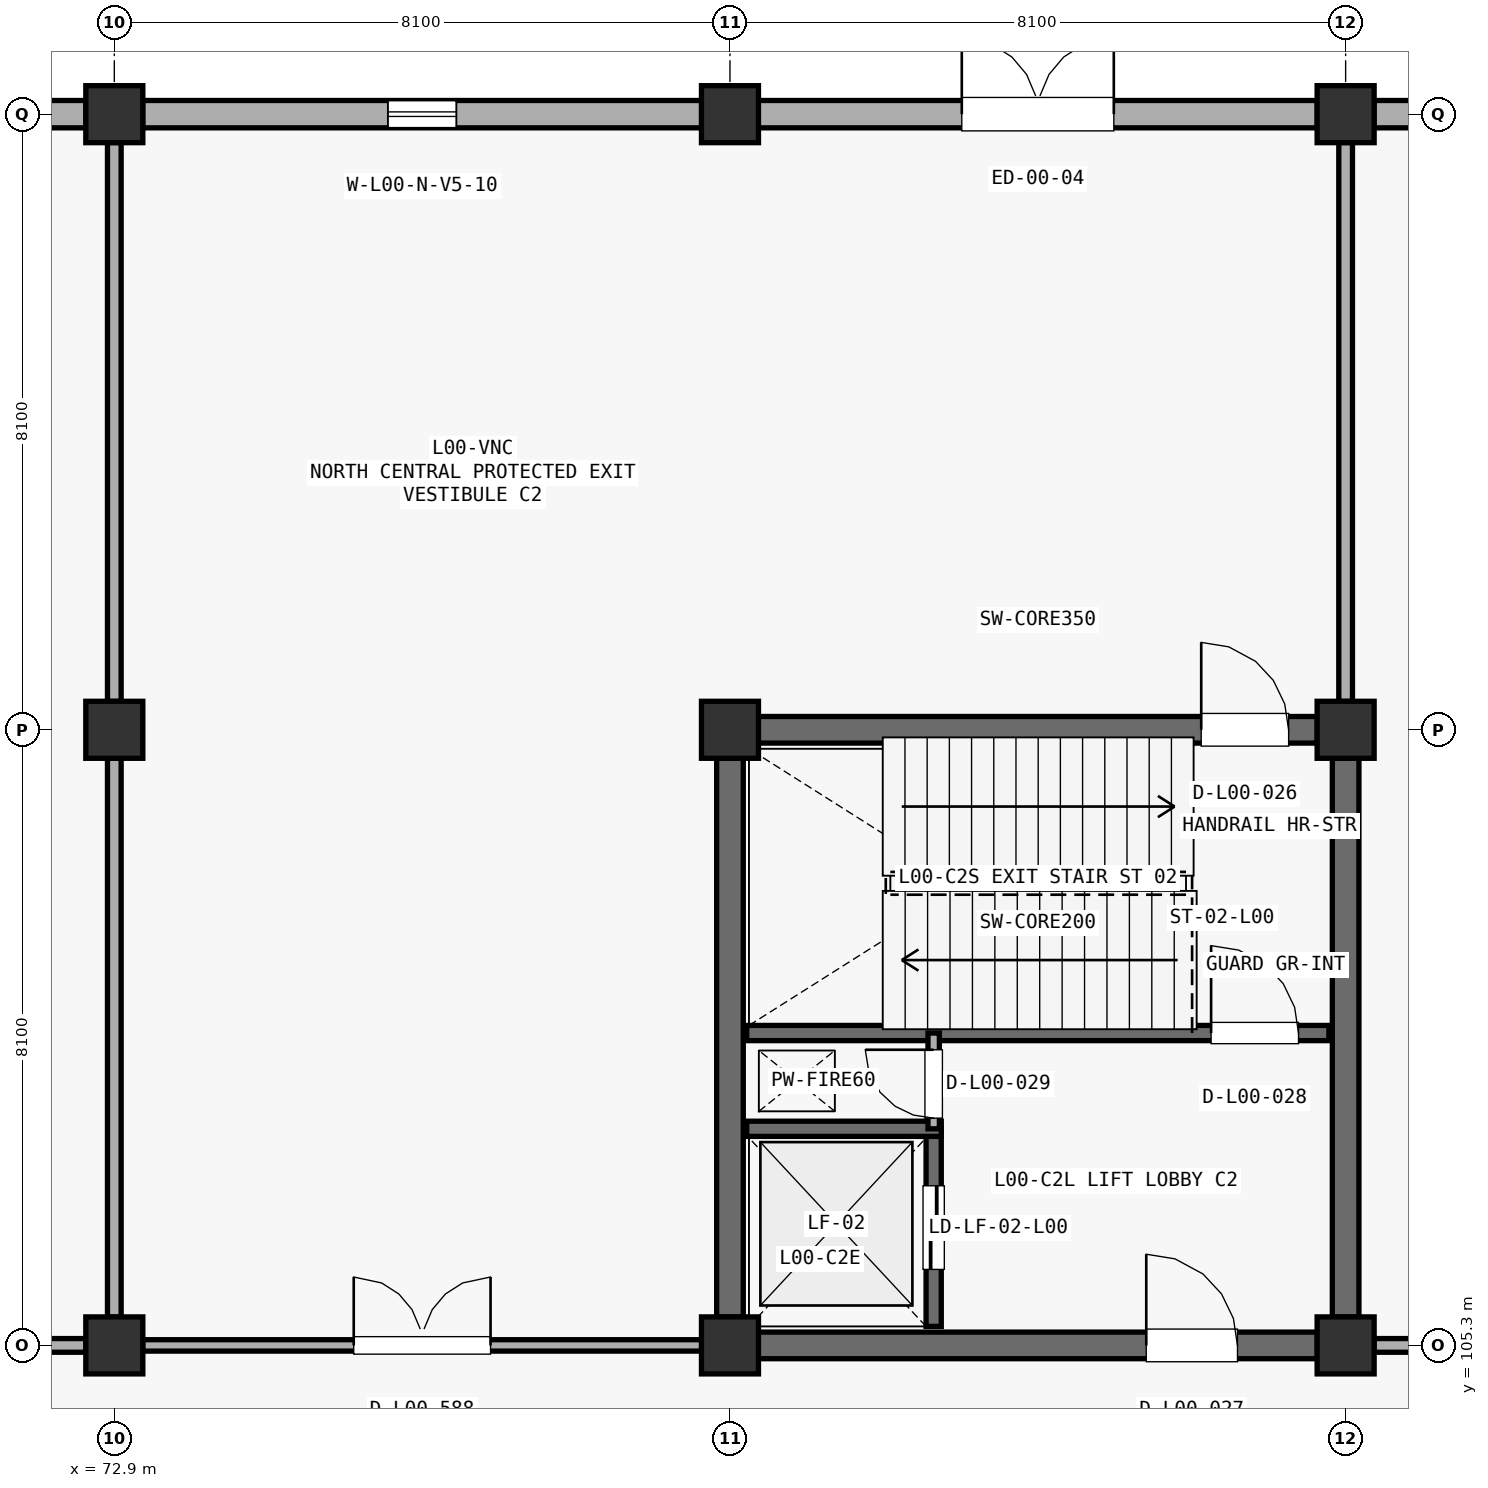
"""IFC4 building model, lengths in metres.
Left out: names, types, materials, properties, quantities, classifications, styles, units other than length and angle.
Written with IfcOpenShell. Run it as: python <this file> out.ifc"""

import sys

from ifc_helpers import new_model, si_unit, direction, frame, frame_2d, origin, origin_2d, place, context, subcontext, project, spatial, rectangle, extrude, element, fill, save


model = new_model("IFC4")
c1 = context("Model", 3, precision=1e-05, world=origin(), true_north=direction((0.0, 1.0)))
c2 = subcontext(c1, "Body", "Model", "MODEL_VIEW")
j1 = project(units=[si_unit("LENGTHUNIT", "METRE"), si_unit("PLANEANGLEUNIT", "RADIAN")], contexts=[c1])
p1 = place(None, origin())
s1 = spatial("IfcSite", under=j1, at=p1, CompositionType="ELEMENT")
p2 = place(p1, origin())
s2 = spatial("IfcBuilding", under=s1, at=p2, CompositionType="ELEMENT")
p3 = place(p2, origin())
s3 = spatial("IfcBuildingStorey", under=s2, at=p3, CompositionType="ELEMENT", Elevation=0.0)
for number, where, z_axis, x_axis in (
    (1, (72.9, 105.3, 0.0), (0.0, 0.0, 1.0), (1.0, 0.0, 0.0)),
    (2, (72.9, 113.4, 0.0), (0.0, 0.0, 1.0), (1.0, 0.0, 0.0)),
    (3, (72.9, 121.5, 0.0), (0.0, 0.0, 1.0), (1.0, 0.0, 0.0)),
    (4, (81.0, 105.3, 0.0), (0.0, 0.0, 1.0), (1.0, 0.0, 0.0)),
    (5, (81.0, 113.4, 0.0), (0.0, 0.0, 1.0), (1.0, 0.0, 0.0)),
    (6, (81.0, 121.5, 0.0), (0.0, 0.0, 1.0), (1.0, 0.0, 0.0)),
    (7, (89.1, 105.3, 0.0), (0.0, 0.0, 1.0), (1.0, 0.0, 0.0)),
    (8, (89.1, 113.4, 0.0), (0.0, 0.0, 1.0), (1.0, 0.0, 0.0)),
    (9, (89.1, 121.5, 0.0), (0.0, 0.0, 1.0), (1.0, 0.0, 0.0)),
):
    element("IfcColumn", number, at=place(p3, frame(where, z_axis=z_axis, x_axis=x_axis)), inside=s3, PredefinedType="COLUMN", context=c2, shape_type="SweptSolid", body=[
        extrude(rectangle(XDim=0.75, YDim=0.75, at=origin_2d()), origin(), (0.0, 0.0, 1.0), 5.1),
    ])
p4 = place(p3, frame((65.173, 121.5, 0.0), z_axis=(0.0, 0.0, 1.0), x_axis=(1.0, 0.0, 0.0)))
e10 = element("IfcWall", 10, at=p4, inside=s3, PredefinedType="STANDARD", context=c2, shape_type="SweptSolid", body=[
    extrude(rectangle(XDim=7.354, YDim=0.36, at=frame_2d((3.677, 0.0))), origin(), (0.0, 0.0, 1.0), 3.872),
])
p5 = place(p4, frame((2.477, 0.0, 0.0)))
e11 = element("IfcOpeningElement", 11, at=p5, cuts=e10, PredefinedType="OPENING", context=c2, shape_type="SweptSolid", body=[
    extrude(rectangle(XDim=2.4, YDim=2.4, at=frame_2d((1.2, 1.2))), frame((0.0, 0.19, 0.0), z_axis=(0.0, -1.0, 0.0), x_axis=(1.0, 0.0, 0.0)), (0.0, 0.0, 1.0), 0.38),
])
p6 = place(p3, frame((73.273, 121.5, 0.0), z_axis=(0.0, 0.0, 1.0), x_axis=(1.0, 0.0, 0.0)))
e12 = element("IfcWall", 12, at=p6, inside=s3, PredefinedType="STANDARD", context=c2, shape_type="SweptSolid", body=[
    extrude(rectangle(XDim=7.354, YDim=0.36, at=frame_2d((3.677, 0.0))), origin(), (0.0, 0.0, 1.0), 4.407),
])
p7 = place(p6, frame((3.227, 0.0, 0.85)))
e13 = element("IfcOpeningElement", 13, at=p7, cuts=e12, PredefinedType="OPENING", context=c2, shape_type="SweptSolid", body=[
    extrude(rectangle(XDim=0.9, YDim=1.9, at=frame_2d((0.45, 0.95))), frame((0.0, 0.19, 0.0), z_axis=(0.0, -1.0, 0.0), x_axis=(1.0, 0.0, 0.0)), (0.0, 0.0, 1.0), 0.38),
])
p8 = place(p3, frame((81.373, 121.5, 0.0), z_axis=(0.0, 0.0, 1.0), x_axis=(1.0, 0.0, 0.0)))
e14 = element("IfcWall", 14, at=p8, inside=s3, PredefinedType="STANDARD", context=c2, shape_type="SweptSolid", body=[
    extrude(rectangle(XDim=7.354, YDim=0.36, at=frame_2d((3.677, 0.0))), origin(), (0.0, 0.0, 1.0), 4.172),
])
p9 = place(p8, frame((2.677, 0.0, 0.0)))
e15 = element("IfcOpeningElement", 15, at=p9, cuts=e14, PredefinedType="OPENING", context=c2, shape_type="SweptSolid", body=[
    extrude(rectangle(XDim=2.0, YDim=2.2, at=frame_2d((1.0, 1.1))), frame((0.0, 0.19, 0.0), z_axis=(0.0, -1.0, 0.0), x_axis=(1.0, 0.0, 0.0)), (0.0, 0.0, 1.0), 0.38),
])
p10 = place(p3, frame((89.473, 121.5, 0.0), z_axis=(0.0, 0.0, 1.0), x_axis=(1.0, 0.0, 0.0)))
e16 = element("IfcWall", 16, at=p10, inside=s3, PredefinedType="STANDARD", context=c2, shape_type="SweptSolid", body=[
    extrude(rectangle(XDim=7.354, YDim=0.36, at=frame_2d((3.677, 0.0))), origin(), (0.0, 0.0, 1.0), 4.222),
])
p11 = place(p10, frame((2.677, 0.0, 0.85)))
e17 = element("IfcOpeningElement", 17, at=p11, cuts=e16, PredefinedType="OPENING", context=c2, shape_type="SweptSolid", body=[
    extrude(rectangle(XDim=2.0, YDim=1.4, at=frame_2d((1.0, 0.7))), frame((0.0, 0.19, 0.0), z_axis=(0.0, -1.0, 0.0), x_axis=(1.0, 0.0, 0.0)), (0.0, 0.0, 1.0), 0.38),
])
p12 = place(p3, frame((81.373, 113.4, 0.0), z_axis=(0.0, 0.0, 1.0), x_axis=(1.0, 0.0, 0.0)))
e18 = element("IfcWall", 18, at=p12, inside=s3, PredefinedType="SHEAR", context=c2, shape_type="SweptSolid", body=[
    extrude(rectangle(XDim=7.354, YDim=0.35, at=frame_2d((3.677, 0.0))), origin(), (0.0, 0.0, 1.0), 4.822),
])
p13 = place(p12, frame((5.827, 0.0, 0.0)))
e19 = element("IfcOpeningElement", 19, at=p13, cuts=e18, PredefinedType="OPENING", context=c2, shape_type="SweptSolid", body=[
    extrude(rectangle(XDim=1.15, YDim=2.2, at=frame_2d((0.575, 1.1))), frame((0.0, 0.185, 0.0), z_axis=(0.0, -1.0, 0.0), x_axis=(1.0, 0.0, 0.0)), (0.0, 0.0, 1.0), 0.37),
])
for number, where, z_axis, x_axis in (
    (20, (81.0, 105.673, 0.0), (0.0, 0.0, 1.0), (0.0, 1.0, 0.0)),
    (21, (89.1, 105.673, 0.0), (0.0, 0.0, 1.0), (0.0, 1.0, 0.0)),
):
    element("IfcWall", number, at=place(p3, frame(where, z_axis=z_axis, x_axis=x_axis)), inside=s3, PredefinedType="SHEAR", context=c2, shape_type="SweptSolid", body=[
        extrude(rectangle(XDim=7.354, YDim=0.35, at=frame_2d((3.677, 0.0))), origin(), (0.0, 0.0, 1.0), 4.822),
    ])
p14 = place(p3, frame((81.373, 105.3, 0.0), z_axis=(0.0, 0.0, 1.0), x_axis=(1.0, 0.0, 0.0)))
e22 = element("IfcWall", 22, at=p14, inside=s3, PredefinedType="SHEAR", context=c2, shape_type="SweptSolid", body=[
    extrude(rectangle(XDim=7.354, YDim=0.35, at=frame_2d((3.677, 0.0))), origin(), (0.0, 0.0, 1.0), 4.822),
])
p15 = place(p14, frame((5.104, 0.0, 0.0)))
e23 = element("IfcOpeningElement", 23, at=p15, cuts=e22, PredefinedType="OPENING", context=c2, shape_type="SweptSolid", body=[
    extrude(rectangle(XDim=1.2, YDim=2.2, at=frame_2d((0.6, 1.1))), frame((0.0, 0.185, 0.0), z_axis=(0.0, -1.0, 0.0), x_axis=(1.0, 0.0, 0.0)), (0.0, 0.0, 1.0), 0.37),
])
p16 = place(p3, frame((81.22, 109.41, 0.0), z_axis=(0.0, 0.0, 1.0), x_axis=(1.0, 0.0, 0.0)))
e24 = element("IfcWall", 24, at=p16, inside=s3, PredefinedType="SHEAR", context=c2, shape_type="SweptSolid", body=[
    extrude(rectangle(XDim=7.66, YDim=0.2, at=frame_2d((3.83, 0.0))), origin(), (0.0, 0.0, 1.0), 4.822),
])
p17 = place(p16, frame((6.11, 0.0, 0.0)))
e25 = element("IfcOpeningElement", 25, at=p17, cuts=e24, PredefinedType="OPENING", context=c2, shape_type="SweptSolid", body=[
    extrude(rectangle(XDim=1.15, YDim=2.2, at=frame_2d((0.575, 1.1))), frame((0.0, 0.11, 0.0), z_axis=(0.0, -1.0, 0.0), x_axis=(1.0, 0.0, 0.0)), (0.0, 0.0, 1.0), 0.22),
])
p18 = place(p3, frame((83.68, 105.55, 0.0), z_axis=(0.0, 0.0, 1.0), x_axis=(0.0, 1.0, 0.0)))
e26 = element("IfcWall", 26, at=p18, inside=s3, PredefinedType="SHEAR", context=c2, shape_type="SweptSolid", body=[
    extrude(rectangle(XDim=2.6, YDim=0.2, at=frame_2d((1.3, 0.0))), origin(), (0.0, 0.0, 1.0), 4.822),
])
p19 = place(p18, frame((0.75, 0.0, 0.0)))
e27 = element("IfcOpeningElement", 27, at=p19, cuts=e26, PredefinedType="OPENING", context=c2, shape_type="SweptSolid", body=[
    extrude(rectangle(XDim=1.1, YDim=2.2, at=frame_2d((0.55, 1.1))), frame((0.0, 0.11, 0.0), z_axis=(0.0, -1.0, 0.0), x_axis=(1.0, 0.0, 0.0)), (0.0, 0.0, 1.0), 0.22),
])
p20 = place(p3, frame((81.22, 108.15, 0.0), z_axis=(0.0, 0.0, 1.0), x_axis=(1.0, 0.0, 0.0)))
e28 = element("IfcWall", 28, at=p20, inside=s3, PredefinedType="SHEAR", context=c2, shape_type="SweptSolid", body=[
    extrude(rectangle(XDim=2.56, YDim=0.2, at=frame_2d((1.28, 0.0))), origin(), (0.0, 0.0, 1.0), 4.822),
])
p21 = place(p3, frame((83.68, 108.15, 0.0), z_axis=(0.0, 0.0, 1.0), x_axis=(0.0, 1.0, 0.0)))
e29 = element("IfcWall", 29, at=p21, inside=s3, PredefinedType="PARTITIONING", context=c2, shape_type="SweptSolid", body=[
    extrude(rectangle(XDim=1.26, YDim=0.15, at=frame_2d((0.63, 0.0))), origin(), (0.0, 0.0, 1.0), 4.822),
])
p22 = place(p21, frame((0.14, 0.0, 0.0)))
e30 = element("IfcOpeningElement", 30, at=p22, cuts=e29, PredefinedType="OPENING", context=c2, shape_type="SweptSolid", body=[
    extrude(rectangle(XDim=0.9, YDim=2.15, at=frame_2d((0.45, 1.075))), frame((0.0, 0.085, 0.0), z_axis=(0.0, -1.0, 0.0), x_axis=(1.0, 0.0, 0.0)), (0.0, 0.0, 1.0), 0.17),
])
p23 = place(p3, frame((65.173, 105.3, 0.0), z_axis=(0.0, 0.0, 1.0), x_axis=(1.0, 0.0, 0.0)))
e31 = element("IfcWall", 31, at=p23, inside=s3, PredefinedType="PARTITIONING", context=c2, shape_type="SweptSolid", body=[
    extrude(rectangle(XDim=7.354, YDim=0.18, at=frame_2d((3.677, 0.0))), origin(), (0.0, 0.0, 1.0), 4.222),
])
p24 = place(p23, frame((3.137, 0.0, 0.0)))
e32 = element("IfcOpeningElement", 32, at=p24, cuts=e31, PredefinedType="OPENING", context=c2, shape_type="SweptSolid", body=[
    extrude(rectangle(XDim=1.08, YDim=2.15, at=frame_2d((0.54, 1.075))), frame((0.0, 0.1, 0.0), z_axis=(0.0, -1.0, 0.0), x_axis=(1.0, 0.0, 0.0)), (0.0, 0.0, 1.0), 0.2),
])
p25 = place(p3, frame((72.9, 105.673, 0.0), z_axis=(0.0, 0.0, 1.0), x_axis=(0.0, 1.0, 0.0)))
e33 = element("IfcWall", 33, at=p25, inside=s3, PredefinedType="PARTITIONING", context=c2, shape_type="SweptSolid", body=[
    extrude(rectangle(XDim=7.354, YDim=0.18, at=frame_2d((3.677, 0.0))), origin(), (0.0, 0.0, 1.0), 4.222),
])
p26 = place(p3, frame((72.9, 113.773, 0.0), z_axis=(0.0, 0.0, 1.0), x_axis=(0.0, 1.0, 0.0)))
e34 = element("IfcWall", 34, at=p26, inside=s3, PredefinedType="PARTITIONING", context=c2, shape_type="SweptSolid", body=[
    extrude(rectangle(XDim=7.354, YDim=0.18, at=frame_2d((3.677, 0.0))), origin(), (0.0, 0.0, 1.0), 3.972),
])
p27 = place(p3, frame((89.473, 105.3, 0.0), z_axis=(0.0, 0.0, 1.0), x_axis=(1.0, 0.0, 0.0)))
e35 = element("IfcWall", 35, at=p27, inside=s3, PredefinedType="PARTITIONING", context=c2, shape_type="SweptSolid", body=[
    extrude(rectangle(XDim=7.354, YDim=0.18, at=frame_2d((3.677, 0.0))), origin(), (0.0, 0.0, 1.0), 4.072),
])
p28 = place(p27, frame((3.177, 0.0, 0.0)))
e36 = element("IfcOpeningElement", 36, at=p28, cuts=e35, PredefinedType="OPENING", context=c2, shape_type="SweptSolid", body=[
    extrude(rectangle(XDim=1.0, YDim=2.15, at=frame_2d((0.5, 1.075))), frame((0.0, 0.1, 0.0), z_axis=(0.0, -1.0, 0.0), x_axis=(1.0, 0.0, 0.0)), (0.0, 0.0, 1.0), 0.2),
])
p29 = place(p3, frame((89.1, 113.773, 0.0), z_axis=(0.0, 0.0, 1.0), x_axis=(0.0, 1.0, 0.0)))
e37 = element("IfcWall", 37, at=p29, inside=s3, PredefinedType="PARTITIONING", context=c2, shape_type="SweptSolid", body=[
    extrude(rectangle(XDim=7.354, YDim=0.18, at=frame_2d((3.677, 0.0))), origin(), (0.0, 0.0, 1.0), 4.222),
])
p30 = place(p3, frame((73.273, 105.3, 0.0), z_axis=(0.0, 0.0, 1.0), x_axis=(1.0, 0.0, 0.0)))
e38 = element("IfcWall", 38, at=p30, inside=s3, PredefinedType="PARTITIONING", context=c2, shape_type="SweptSolid", body=[
    extrude(rectangle(XDim=7.354, YDim=0.15, at=frame_2d((3.677, 0.0))), origin(), (0.0, 0.0, 1.0), 3.972),
])
p31 = place(p30, frame((2.777, 0.0, 0.0)))
e39 = element("IfcOpeningElement", 39, at=p31, cuts=e38, PredefinedType="OPENING", context=c2, shape_type="SweptSolid", body=[
    extrude(rectangle(XDim=1.8, YDim=2.2, at=frame_2d((0.9, 1.1))), frame((0.0, 0.085, 0.0), z_axis=(0.0, -1.0, 0.0), x_axis=(1.0, 0.0, 0.0)), (0.0, 0.0, 1.0), 0.17),
])
p32 = place(p7, origin())
e40 = element("IfcWindow", 40, at=p32, inside=s3, PartitioningType="SINGLE_PANEL", PredefinedType="WINDOW", context=c2, shape_type="SweptSolid", body=[
    extrude(rectangle(XDim=0.9, YDim=1.9, at=frame_2d((0.45, 0.95))), frame((0.0, 0.03, 0.0), z_axis=(0.0, -1.0, 0.0), x_axis=(1.0, 0.0, 0.0)), (0.0, 0.0, 1.0), 0.06),
])
fill(e13, e40)
p33 = place(p9, origin())
e41 = element("IfcDoor", 41, at=p33, inside=s3, OperationType="DOUBLE_SWING_LEFT", PredefinedType="DOOR", context=c2, shape_type="SweptSolid", body=[
    extrude(rectangle(XDim=2.0, YDim=2.2, at=frame_2d((1.0, 1.1))), frame((0.0, 0.025, 0.0), z_axis=(0.0, -1.0, 0.0), x_axis=(1.0, 0.0, 0.0)), (0.0, 0.0, 1.0), 0.05),
])
fill(e15, e41)
p34 = place(p13, origin())
e42 = element("IfcDoor", 42, at=p34, inside=s3, OperationType="SINGLE_SWING_LEFT", PredefinedType="DOOR", context=c2, shape_type="SweptSolid", body=[
    extrude(rectangle(XDim=1.15, YDim=2.2, at=frame_2d((0.575, 1.1))), frame((0.0, 0.025, 0.0), z_axis=(0.0, -1.0, 0.0), x_axis=(1.0, 0.0, 0.0)), (0.0, 0.0, 1.0), 0.05),
])
fill(e19, e42)
p35 = place(p15, origin())
e43 = element("IfcDoor", 43, at=p35, inside=s3, OperationType="SINGLE_SWING_LEFT", PredefinedType="DOOR", context=c2, shape_type="SweptSolid", body=[
    extrude(rectangle(XDim=1.2, YDim=2.2, at=frame_2d((0.6, 1.1))), frame((0.0, 0.025, 0.0), z_axis=(0.0, -1.0, 0.0), x_axis=(1.0, 0.0, 0.0)), (0.0, 0.0, 1.0), 0.05),
])
fill(e23, e43)
p36 = place(p17, origin())
e44 = element("IfcDoor", 44, at=p36, inside=s3, OperationType="SINGLE_SWING_LEFT", PredefinedType="DOOR", context=c2, shape_type="SweptSolid", body=[
    extrude(rectangle(XDim=1.15, YDim=2.2, at=frame_2d((0.575, 1.1))), frame((0.0, 0.025, 0.0), z_axis=(0.0, -1.0, 0.0), x_axis=(1.0, 0.0, 0.0)), (0.0, 0.0, 1.0), 0.05),
])
fill(e25, e44)
p37 = place(p19, origin())
e45 = element("IfcDoor", 45, at=p37, inside=s3, OperationType="SLIDING_TO_LEFT", PredefinedType="DOOR", context=c2, shape_type="SweptSolid", body=[
    extrude(rectangle(XDim=1.1, YDim=2.2, at=frame_2d((0.55, 1.1))), frame((0.0, 0.025, 0.0), z_axis=(0.0, -1.0, 0.0), x_axis=(1.0, 0.0, 0.0)), (0.0, 0.0, 1.0), 0.05),
])
fill(e27, e45)
p38 = place(p22, origin())
e46 = element("IfcDoor", 46, at=p38, inside=s3, OperationType="SINGLE_SWING_RIGHT", PredefinedType="DOOR", context=c2, shape_type="SweptSolid", body=[
    extrude(rectangle(XDim=0.9, YDim=2.15, at=frame_2d((0.45, 1.075))), frame((0.0, 0.025, 0.0), z_axis=(0.0, -1.0, 0.0), x_axis=(1.0, 0.0, 0.0)), (0.0, 0.0, 1.0), 0.05),
])
fill(e30, e46)
p39 = place(p31, origin())
e47 = element("IfcDoor", 47, at=p39, inside=s3, OperationType="DOUBLE_SWING_LEFT", PredefinedType="DOOR", context=c2, shape_type="SweptSolid", body=[
    extrude(rectangle(XDim=1.8, YDim=2.2, at=frame_2d((0.9, 1.1))), frame((0.0, 0.025, 0.0), z_axis=(0.0, -1.0, 0.0), x_axis=(1.0, 0.0, 0.0)), (0.0, 0.0, 1.0), 0.05),
])
fill(e39, e47)
save(model, sys.argv[1])
